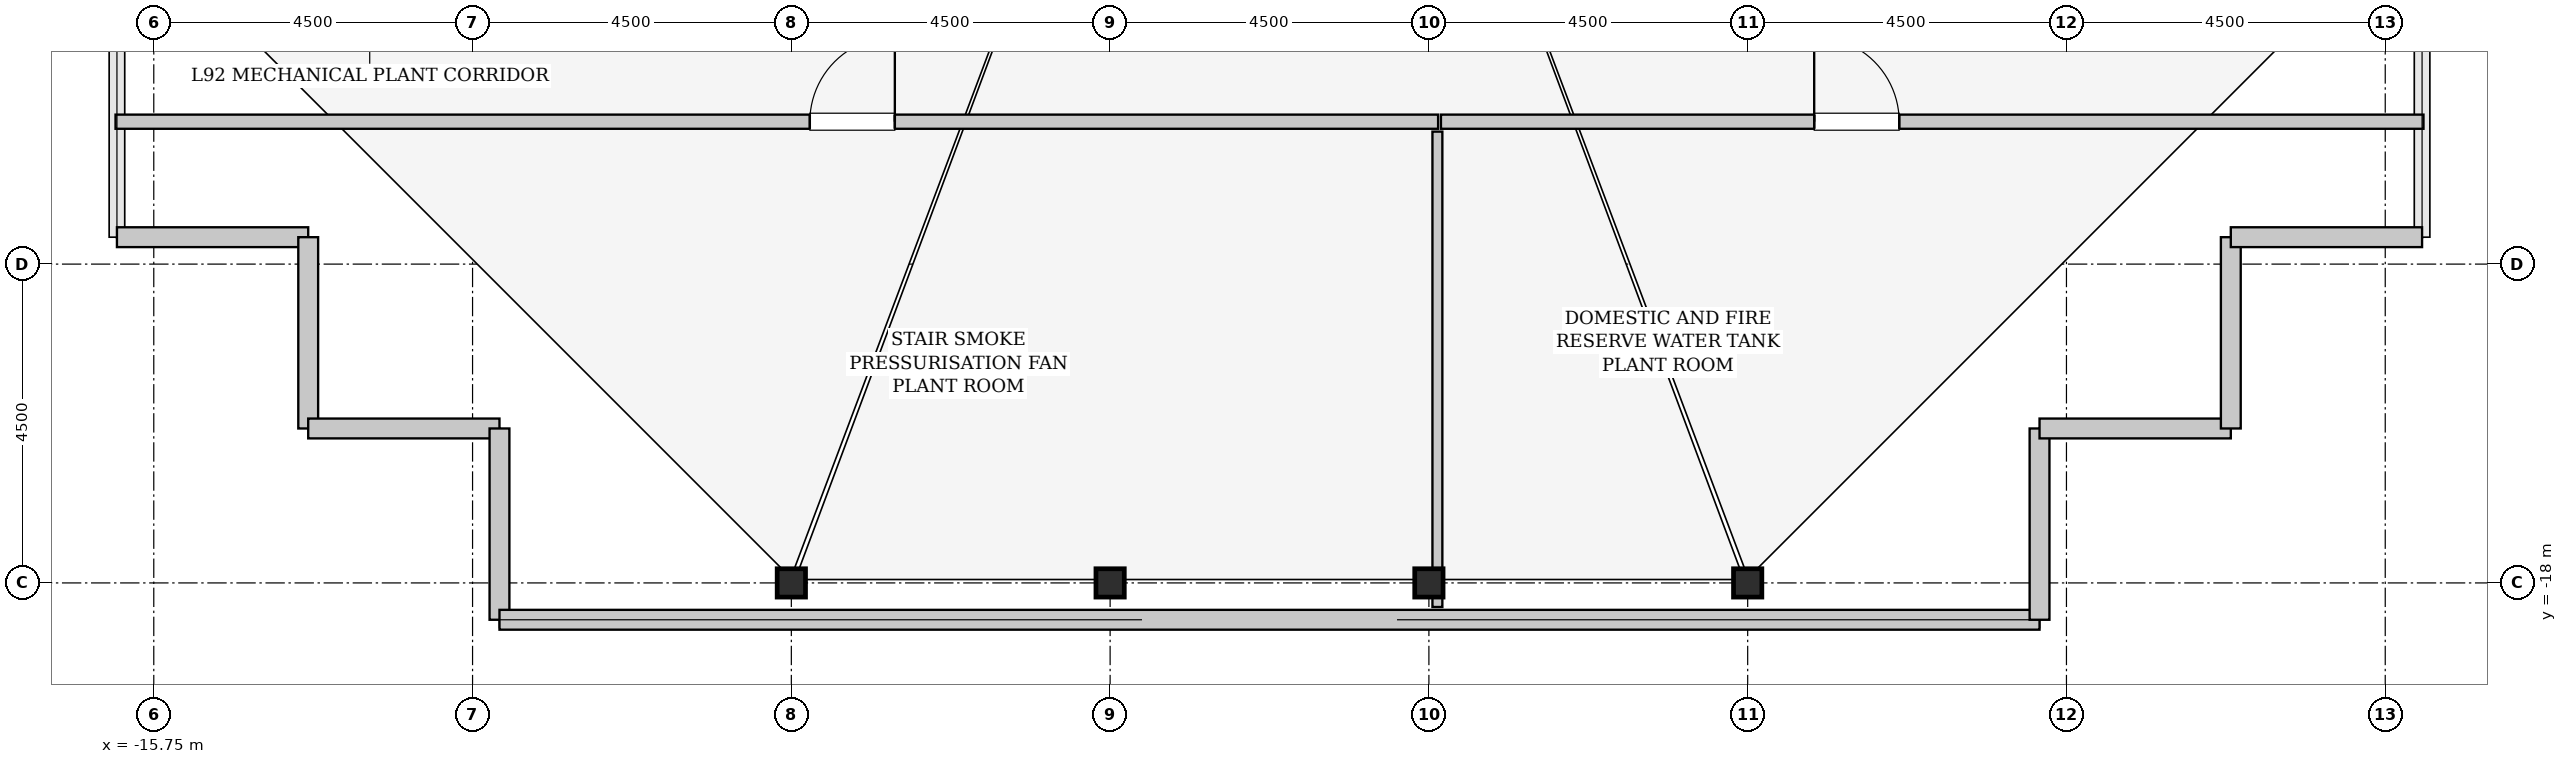
"""IFC4 building model, lengths in metres.
Left out: names, types, materials, properties, quantities, classifications, styles, units other than length and angle.
Written with IfcOpenShell. Run it as: python <this file> out.ifc"""

import sys

from ifc_helpers import new_model, si_unit, direction, frame, frame_2d, origin, origin_2d, place, context, subcontext, project, spatial, rectangle, hollow_rectangle, extrude, source, transform, mapped, element, fill, save


model = new_model("IFC4")
c1 = context("Model", 3, precision=1e-05, world=origin(), true_north=direction((0.0, 1.0)))
c2 = subcontext(c1, "Body", "Model", "MODEL_VIEW")
j1 = project(units=[si_unit("LENGTHUNIT", "METRE"), si_unit("PLANEANGLEUNIT", "RADIAN")], contexts=[c1])
p1 = place(None, origin())
s1 = spatial("IfcSite", under=j1, at=p1, CompositionType="ELEMENT")
p2 = place(p1, origin())
s2 = spatial("IfcBuilding", under=s1, at=p2, CompositionType="ELEMENT")
p3 = place(p2, frame((0.0, 0.0, 367.4)))
s3 = spatial("IfcBuildingStorey", under=s2, at=p3, CompositionType="ELEMENT", Elevation=367.4)
m1 = source(origin(), c2, "Body", "SweptSolid", [
    extrude(hollow_rectangle(XDim=0.4, YDim=0.4, WallThickness=0.02, InnerFilletRadius=0.02, OuterFilletRadius=0.04, at=origin_2d()), origin(), (0.0, 0.0, 1.0), 4.4),
])
for number, where, z_axis, x_axis in (
    (1, (-6.75, -18.0, 0.0), (0.0, 0.0, 1.0), (1.0, 0.0, 0.0)),
    (2, (-2.25, -18.0, 0.0), (0.0, 0.0, 1.0), (1.0, 0.0, 0.0)),
    (3, (2.25, -18.0, 0.0), (0.0, 0.0, 1.0), (1.0, 0.0, 0.0)),
    (4, (6.75, -18.0, 0.0), (0.0, 0.0, 1.0), (1.0, 0.0, 0.0)),
):
    element("IfcColumn", number, at=place(p3, frame(where, z_axis=z_axis, x_axis=x_axis)), inside=s3, PredefinedType="COLUMN", context=c2, shape_type="MappedRepresentation", body=[
        mapped(m1, transform((0.0, 0.0, 0.0), x_axis=(1.0, 0.0, 0.0), y_axis=(0.0, 1.0, 0.0), z_axis=(0.0, 0.0, 1.0), scale=1.0)),
    ])
m2 = source(origin(), c2, "Body", "SweptSolid", [
    extrude(rectangle(XDim=2.7, YDim=0.28, at=frame_2d((1.35, 0.0))), origin(), (0.0, 0.0, 1.0), 4.1),
])
for number, where, z_axis, x_axis in (
    (5, (-16.27, -13.12, 0.0), (0.0, 0.0, 1.0), (1.0, 0.0, 0.0)),
    (6, (-13.57, -13.12, 0.0), (0.0, 0.0, 1.0), (0.0, -1.0, 0.0)),
    (7, (-13.57, -15.82, 0.0), (0.0, 0.0, 1.0), (1.0, 0.0, 0.0)),
    (8, (-10.87, -15.82, 0.0), (0.0, 0.0, 1.0), (0.0, -1.0, 0.0)),
):
    element("IfcWall", number, at=place(p3, frame(where, z_axis=z_axis, x_axis=x_axis)), inside=s3, PredefinedType="SOLIDWALL", context=c2, shape_type="MappedRepresentation", body=[
        mapped(m2, transform((0.0, 0.0, 0.0), x_axis=(1.0, 0.0, 0.0), y_axis=(0.0, 1.0, 0.0), z_axis=(0.0, 0.0, 1.0), scale=1.0)),
    ])
m3 = source(origin(), c2, "Body", "SweptSolid", [
    extrude(rectangle(XDim=21.74, YDim=0.28, at=frame_2d((10.87, 0.0))), origin(), (0.0, 0.0, 1.0), 1.1),
])
p4 = place(p3, frame((-10.87, -18.52, 0.0), z_axis=(0.0, 0.0, 1.0), x_axis=(1.0, 0.0, 0.0)))
e9 = element("IfcWall", 9, at=p4, inside=s3, PredefinedType="SOLIDWALL", context=c2, shape_type="MappedRepresentation", body=[
    mapped(m3, transform((0.0, 0.0, 0.0), x_axis=(1.0, 0.0, 0.0), y_axis=(0.0, 1.0, 0.0), z_axis=(0.0, 0.0, 1.0), scale=1.0)),
])
for number, where, z_axis, x_axis in (
    (10, (10.87, -18.52, 0.0), (0.0, 0.0, 1.0), (0.0, 1.0, 0.0)),
    (11, (10.87, -15.82, 0.0), (0.0, 0.0, 1.0), (1.0, 0.0, 0.0)),
    (12, (13.57, -15.82, 0.0), (0.0, 0.0, 1.0), (0.0, 1.0, 0.0)),
    (13, (13.57, -13.12, 0.0), (0.0, 0.0, 1.0), (1.0, 0.0, 0.0)),
):
    element("IfcWall", number, at=place(p3, frame(where, z_axis=z_axis, x_axis=x_axis)), inside=s3, PredefinedType="SOLIDWALL", context=c2, shape_type="MappedRepresentation", body=[
        mapped(m2, transform((0.0, 0.0, 0.0), x_axis=(1.0, 0.0, 0.0), y_axis=(0.0, 1.0, 0.0), z_axis=(0.0, 0.0, 1.0), scale=1.0)),
    ])
m4 = source(origin(), c2, "Body", "SweptSolid", [
    extrude(rectangle(XDim=18.67, YDim=0.2, at=frame_2d((9.335, 0.0))), origin(), (0.0, 0.0, 1.0), 4.085),
])
p5 = place(p3, frame((-16.29, -11.49, 0.0), z_axis=(0.0, 0.0, 1.0), x_axis=(1.0, 0.0, 0.0)))
e14 = element("IfcWall", 14, at=p5, inside=s3, PredefinedType="SOLIDWALL", context=c2, shape_type="MappedRepresentation", body=[
    mapped(m4, transform((0.0, 0.0, 0.0), x_axis=(1.0, 0.0, 0.0), y_axis=(0.0, 1.0, 0.0), z_axis=(0.0, 0.0, 1.0), scale=1.0)),
])
p6 = place(p5, frame((9.801, 0.0, 0.0)))
e15 = element("IfcOpeningElement", 15, at=p6, cuts=e14, PredefinedType="OPENING", context=c2, shape_type="SweptSolid", body=[
    extrude(rectangle(XDim=1.2, YDim=2.15, at=frame_2d((0.6, 1.075))), frame((0.0, 0.11, 0.0), z_axis=(0.0, -1.0, 0.0), x_axis=(1.0, 0.0, 0.0)), (0.0, 0.0, 1.0), 0.22),
])
m5 = source(origin(), c2, "Body", "SweptSolid", [
    extrude(rectangle(XDim=6.71, YDim=0.14, at=frame_2d((3.355, 0.0))), origin(), (0.0, 0.0, 1.0), 4.085),
])
p7 = place(p3, frame((2.37, -18.34, 0.0), z_axis=(0.0, 0.0, 1.0), x_axis=(0.0, 1.0, 0.0)))
e16 = element("IfcWall", 16, at=p7, inside=s3, PredefinedType="PARTITIONING", context=c2, shape_type="MappedRepresentation", body=[
    mapped(m5, transform((0.0, 0.0, 0.0), x_axis=(1.0, 0.0, 0.0), y_axis=(0.0, 1.0, 0.0), z_axis=(0.0, 0.0, 1.0), scale=1.0)),
])
m6 = source(origin(), c2, "Body", "SweptSolid", [
    extrude(rectangle(XDim=13.87, YDim=0.2, at=frame_2d((6.935, 0.0))), origin(), (0.0, 0.0, 1.0), 4.085),
])
p8 = place(p3, frame((2.42, -11.49, 0.0), z_axis=(0.0, 0.0, 1.0), x_axis=(1.0, 0.0, 0.0)))
e17 = element("IfcWall", 17, at=p8, inside=s3, PredefinedType="SOLIDWALL", context=c2, shape_type="MappedRepresentation", body=[
    mapped(m6, transform((0.0, 0.0, 0.0), x_axis=(1.0, 0.0, 0.0), y_axis=(0.0, 1.0, 0.0), z_axis=(0.0, 0.0, 1.0), scale=1.0)),
])
p9 = place(p8, frame((5.269, 0.0, 0.0)))
e18 = element("IfcOpeningElement", 18, at=p9, cuts=e17, PredefinedType="OPENING", context=c2, shape_type="SweptSolid", body=[
    extrude(rectangle(XDim=1.2, YDim=2.15, at=frame_2d((0.6, 1.075))), frame((0.0, 0.11, 0.0), z_axis=(0.0, -1.0, 0.0), x_axis=(1.0, 0.0, 0.0)), (0.0, 0.0, 1.0), 0.22),
])
m7 = source(origin(), c2, "Body", "SweptSolid", [
    extrude(rectangle(XDim=1.2, YDim=2.15, at=frame_2d((0.6, 1.075))), frame((0.0, 0.025, 0.0), z_axis=(0.0, -1.0, 0.0), x_axis=(1.0, 0.0, 0.0)), (0.0, 0.0, 1.0), 0.05),
])
p10 = place(p6, origin())
e19 = element("IfcDoor", 19, at=p10, inside=s3, OperationType="SINGLE_SWING_RIGHT", PredefinedType="DOOR", context=c2, shape_type="MappedRepresentation", body=[
    mapped(m7, transform((0.0, 0.0, 0.0), x_axis=(1.0, 0.0, 0.0), y_axis=(0.0, 1.0, 0.0), z_axis=(0.0, 0.0, 1.0), scale=1.0)),
])
fill(e15, e19)
p11 = place(p9, origin())
e20 = element("IfcDoor", 20, at=p11, inside=s3, OperationType="SINGLE_SWING_LEFT", PredefinedType="DOOR", context=c2, shape_type="MappedRepresentation", body=[
    mapped(m7, transform((0.0, 0.0, 0.0), x_axis=(1.0, 0.0, 0.0), y_axis=(0.0, 1.0, 0.0), z_axis=(0.0, 0.0, 1.0), scale=1.0)),
])
fill(e18, e20)
save(model, sys.argv[1])
